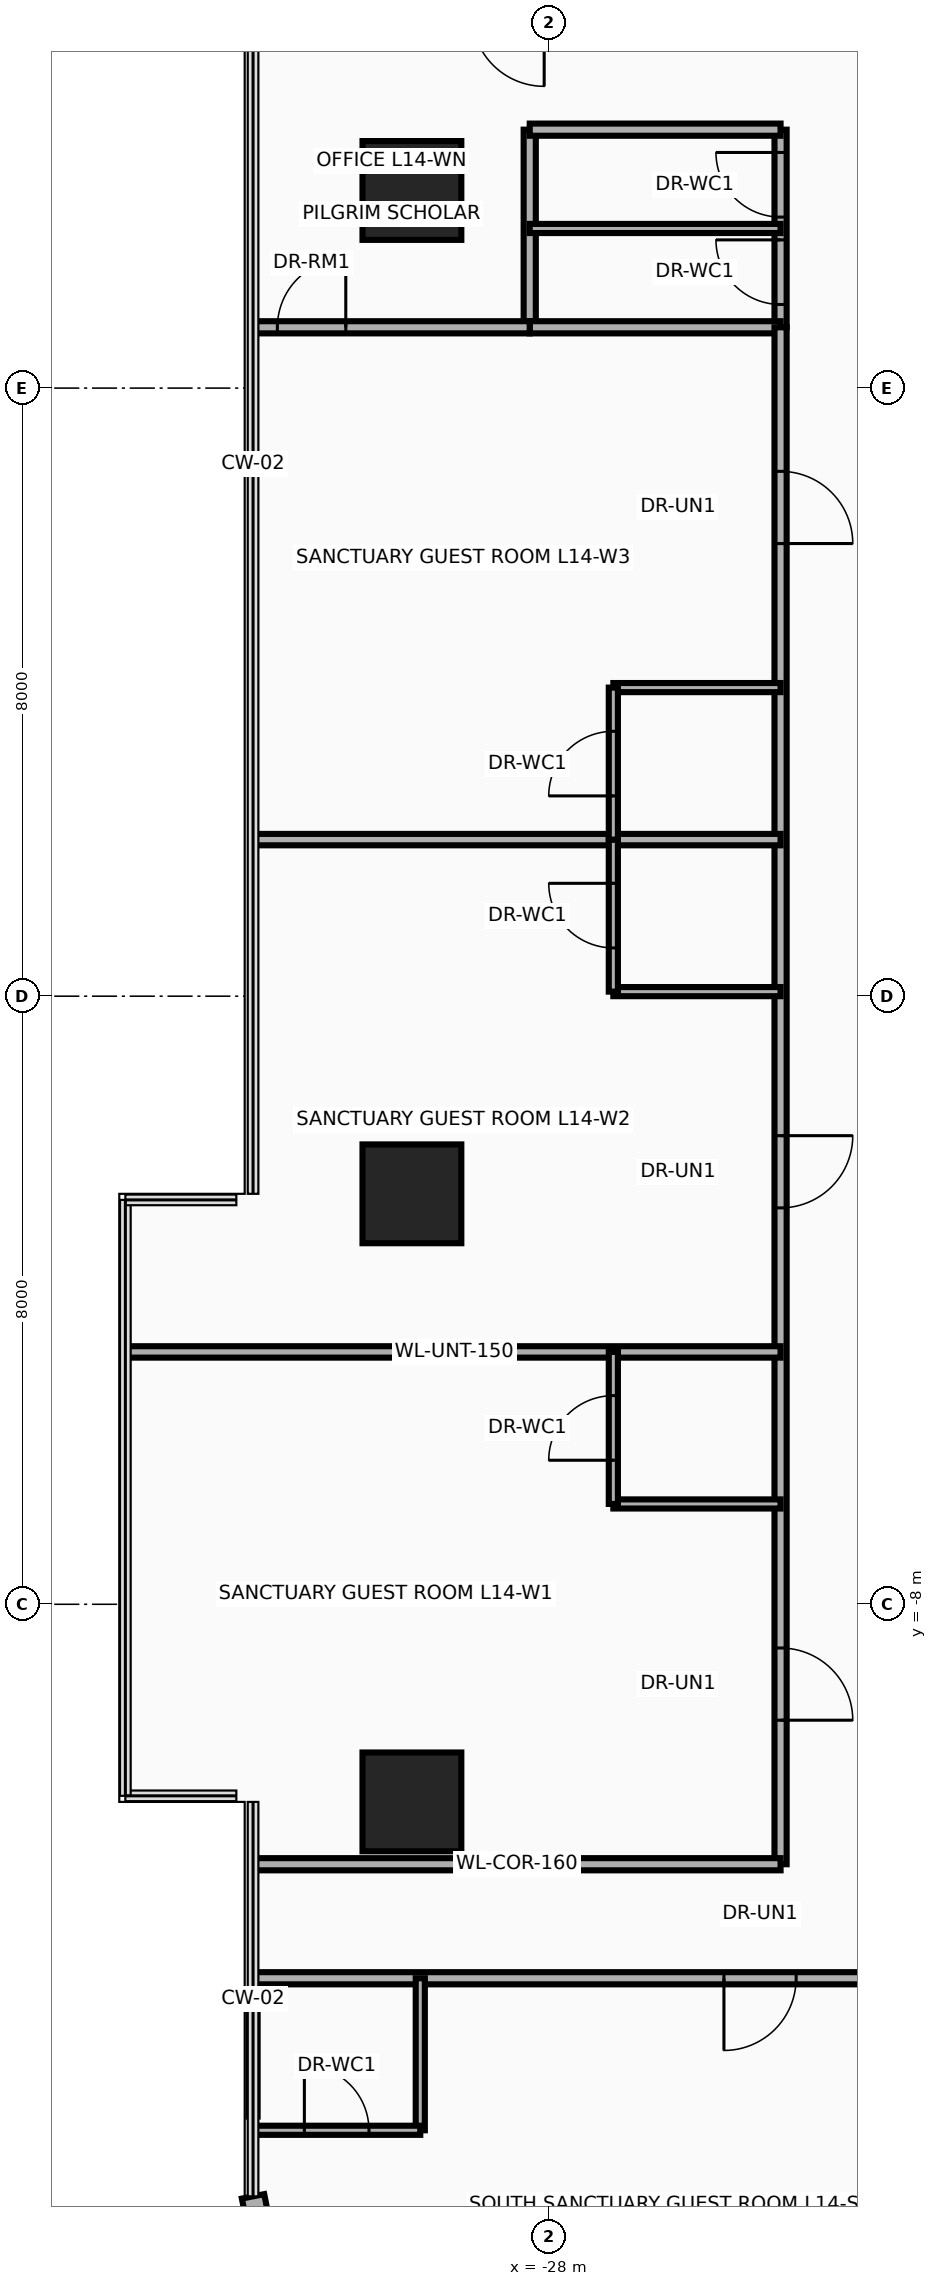
"""IFC4 building model, lengths in metres.
Left out: names, types, materials, properties, quantities, classifications, styles, units other than length and angle.
Written with IfcOpenShell. Run it as: python <this file> out.ifc"""

import sys

from ifc_helpers import new_model, si_unit, direction, frame, frame_2d, origin, origin_2d, place, context, subcontext, project, spatial, rectangle, circle, extrude, source, transform, mapped, element, fill, save


model = new_model("IFC4")
c1 = context("Model", 3, precision=1e-05, world=origin(), true_north=direction((0.0, 1.0)))
c2 = subcontext(c1, "Body", "Model", "MODEL_VIEW")
j1 = project(units=[si_unit("LENGTHUNIT", "METRE"), si_unit("PLANEANGLEUNIT", "RADIAN")], contexts=[c1])
p1 = place(None, origin())
s1 = spatial("IfcSite", under=j1, at=p1, CompositionType="ELEMENT")
p2 = place(p1, origin())
s2 = spatial("IfcBuilding", under=s1, at=p2, CompositionType="ELEMENT")
p3 = place(p2, frame((0.0, 0.0, 59.3)))
s3 = spatial("IfcBuildingStorey", under=s2, at=p3, CompositionType="ELEMENT", Elevation=59.3)
m1 = source(origin(), c2, "Body", "SweptSolid", [
    extrude(circle(Radius=0.65, at=origin_2d()), origin(), (0.0, 0.0, 1.0), 3.7),
])
for number, where, z_axis, x_axis in (
    (1, (-29.8, -10.6, 0.0), (0.0, 0.0, 1.0), (1.0, 0.0, 0.0)),
    (2, (-29.8, -2.6, 0.0), (0.0, 0.0, 1.0), (1.0, 0.0, 0.0)),
    (3, (-29.8, 10.6, 0.0), (0.0, 0.0, 1.0), (1.0, 0.0, 0.0)),
):
    element("IfcColumn", number, at=place(p3, frame(where, z_axis=z_axis, x_axis=x_axis)), inside=s3, PredefinedType="COLUMN", context=c2, shape_type="MappedRepresentation", body=[
        mapped(m1, transform((0.0, 0.0, 0.0), x_axis=(1.0, 0.0, 0.0), y_axis=(0.0, 1.0, 0.0), z_axis=(0.0, 0.0, 1.0), scale=1.0)),
    ])
p4 = place(p3, frame((-31.653, -16.982, 0.0), z_axis=(0.0, 0.0, 1.0), x_axis=(-0.194996050505, 0.980804027463, 0.0)))
e4 = element("IfcWall", 4, at=p4, inside=s3, PredefinedType="SOLIDWALL", context=c2, shape_type="SweptSolid", body=[
    extrude(rectangle(XDim=1.216, YDim=0.3, at=frame_2d((0.608, 0.0))), origin(), (0.0, 0.0, 1.0), 3.46),
])
p5 = place(p3, frame((-28.25, 8.8, 0.0), z_axis=(0.0, 0.0, 1.0), x_axis=(0.0, 1.0, 0.0)))
e5 = element("IfcWall", 5, at=p5, inside=s3, PredefinedType="PARTITIONING", context=c2, shape_type="SweptSolid", body=[
    extrude(rectangle(XDim=2.6, YDim=0.16, at=frame_2d((1.3, 0.0))), origin(), (0.0, 0.0, 1.0), 2.583),
])
p6 = place(p3, frame((-24.95, 8.8, 0.0), z_axis=(0.0, 0.0, 1.0), x_axis=(0.0, 1.0, 0.0)))
e6 = element("IfcWall", 6, at=p6, inside=s3, PredefinedType="PARTITIONING", context=c2, shape_type="SweptSolid", body=[
    extrude(rectangle(XDim=2.6, YDim=0.16, at=frame_2d((1.3, 0.0))), origin(), (0.0, 0.0, 1.0), 2.583),
])
p7 = place(p6, frame((0.3, 0.0, 0.0)))
e7 = element("IfcOpeningElement", 7, at=p7, cuts=e6, PredefinedType="OPENING", context=c2, shape_type="SweptSolid", body=[
    extrude(rectangle(XDim=0.85, YDim=2.1, at=frame_2d((0.425, 1.05))), frame((0.0, 0.095, 0.0), z_axis=(0.0, -1.0, 0.0), x_axis=(1.0, 0.0, 0.0)), (0.0, 0.0, 1.0), 0.19),
])
p8 = place(p6, frame((1.45, 0.0, 0.0)))
e8 = element("IfcOpeningElement", 8, at=p8, cuts=e6, PredefinedType="OPENING", context=c2, shape_type="SweptSolid", body=[
    extrude(rectangle(XDim=0.85, YDim=2.1, at=frame_2d((0.425, 1.05))), frame((0.0, 0.095, 0.0), z_axis=(0.0, -1.0, 0.0), x_axis=(1.0, 0.0, 0.0)), (0.0, 0.0, 1.0), 0.19),
])
for number, where, z_axis, x_axis in (
    (9, (-28.25, 8.8, 0.0), (0.0, 0.0, 1.0), (1.0, 0.0, 0.0)),
    (10, (-28.25, 11.4, 0.0), (0.0, 0.0, 1.0), (1.0, 0.0, 0.0)),
):
    element("IfcWall", number, at=place(p3, frame(where, z_axis=z_axis, x_axis=x_axis)), inside=s3, PredefinedType="PARTITIONING", context=c2, shape_type="SweptSolid", body=[
        extrude(rectangle(XDim=3.3, YDim=0.16, at=frame_2d((1.65, 0.0))), origin(), (0.0, 0.0, 1.0), 3.46),
    ])
p9 = place(p3, frame((-28.25, 10.1, 0.0), z_axis=(0.0, 0.0, 1.0), x_axis=(1.0, 0.0, 0.0)))
e11 = element("IfcWall", 11, at=p9, inside=s3, PredefinedType="PARTITIONING", context=c2, shape_type="SweptSolid", body=[
    extrude(rectangle(XDim=3.3, YDim=0.12, at=frame_2d((1.65, 0.0))), origin(), (0.0, 0.0, 1.0), 3.46),
])
p10 = place(p3, frame((-24.95, -11.42, 0.0), z_axis=(0.0, 0.0, 1.0), x_axis=(0.0, 1.0, 0.0)))
e12 = element("IfcWall", 12, at=p10, inside=s3, PredefinedType="PARTITIONING", context=c2, shape_type="SweptSolid", body=[
    extrude(rectangle(XDim=20.22, YDim=0.16, at=frame_2d((10.11, 0.0))), origin(), (0.0, 0.0, 1.0), 2.583),
])
p11 = place(p10, frame((1.895, 0.0, 0.0)))
e13 = element("IfcOpeningElement", 13, at=p11, cuts=e12, PredefinedType="OPENING", context=c2, shape_type="SweptSolid", body=[
    extrude(rectangle(XDim=0.95, YDim=2.15, at=frame_2d((0.475, 1.075))), frame((0.0, 0.095, 0.0), z_axis=(0.0, -1.0, 0.0), x_axis=(1.0, 0.0, 0.0)), (0.0, 0.0, 1.0), 0.19),
])
p12 = place(p10, frame((8.635, 0.0, 0.0)))
e14 = element("IfcOpeningElement", 14, at=p12, cuts=e12, PredefinedType="OPENING", context=c2, shape_type="SweptSolid", body=[
    extrude(rectangle(XDim=0.95, YDim=2.15, at=frame_2d((0.475, 1.075))), frame((0.0, 0.095, 0.0), z_axis=(0.0, -1.0, 0.0), x_axis=(1.0, 0.0, 0.0)), (0.0, 0.0, 1.0), 0.19),
])
p13 = place(p10, frame((17.375, 0.0, 0.0)))
e15 = element("IfcOpeningElement", 15, at=p13, cuts=e12, PredefinedType="OPENING", context=c2, shape_type="SweptSolid", body=[
    extrude(rectangle(XDim=0.95, YDim=2.15, at=frame_2d((0.475, 1.075))), frame((0.0, 0.095, 0.0), z_axis=(0.0, -1.0, 0.0), x_axis=(1.0, 0.0, 0.0)), (0.0, 0.0, 1.0), 0.19),
])
p14 = place(p3, frame((-31.89, 8.8, 0.0), z_axis=(0.0, 0.0, 1.0), x_axis=(1.0, 0.0, 0.0)))
e16 = element("IfcWall", 16, at=p14, inside=s3, PredefinedType="PARTITIONING", context=c2, shape_type="SweptSolid", body=[
    extrude(rectangle(XDim=3.64, YDim=0.16, at=frame_2d((1.82, 0.0))), origin(), (0.0, 0.0, 1.0), 2.896),
])
p15 = place(p14, frame((0.32, 0.0, 0.0)))
e17 = element("IfcOpeningElement", 17, at=p15, cuts=e16, PredefinedType="OPENING", context=c2, shape_type="SweptSolid", body=[
    extrude(rectangle(XDim=0.9, YDim=2.1, at=frame_2d((0.45, 1.05))), frame((0.0, 0.095, 0.0), z_axis=(0.0, -1.0, 0.0), x_axis=(1.0, 0.0, 0.0)), (0.0, 0.0, 1.0), 0.19),
])
p16 = place(p3, frame((-33.54, -4.68, 0.0), z_axis=(0.0, 0.0, 1.0), x_axis=(1.0, 0.0, 0.0)))
e18 = element("IfcWall", 18, at=p16, inside=s3, PredefinedType="PARTITIONING", context=c2, shape_type="SweptSolid", body=[
    extrude(rectangle(XDim=8.59, YDim=0.15, at=frame_2d((4.295, 0.0))), origin(), (0.0, 0.0, 1.0), 2.896),
])
p17 = place(p3, frame((-31.89, 2.06, 0.0), z_axis=(0.0, 0.0, 1.0), x_axis=(1.0, 0.0, 0.0)))
e19 = element("IfcWall", 19, at=p17, inside=s3, PredefinedType="PARTITIONING", context=c2, shape_type="SweptSolid", body=[
    extrude(rectangle(XDim=6.94, YDim=0.15, at=frame_2d((3.47, 0.0))), origin(), (0.0, 0.0, 1.0), 2.896),
])
p18 = place(p3, frame((-27.15, -6.68, 0.0), z_axis=(0.0, 0.0, 1.0), x_axis=(1.0, 0.0, 0.0)))
e20 = element("IfcWall", 20, at=p18, inside=s3, PredefinedType="PARTITIONING", context=c2, shape_type="SweptSolid", body=[
    extrude(rectangle(XDim=2.2, YDim=0.12, at=frame_2d((1.1, 0.0))), origin(), (0.0, 0.0, 1.0), 2.979),
])
p19 = place(p3, frame((-27.15, -6.68, 0.0), z_axis=(0.0, 0.0, 1.0), x_axis=(0.0, 1.0, 0.0)))
e21 = element("IfcWall", 21, at=p19, inside=s3, PredefinedType="PARTITIONING", context=c2, shape_type="SweptSolid", body=[
    extrude(rectangle(XDim=2.0, YDim=0.12, at=frame_2d((1.0, 0.0))), origin(), (0.0, 0.0, 1.0), 2.979),
])
p20 = place(p19, frame((0.575, 0.0, 0.0)))
e22 = element("IfcOpeningElement", 22, at=p20, cuts=e21, PredefinedType="OPENING", context=c2, shape_type="SweptSolid", body=[
    extrude(rectangle(XDim=0.85, YDim=2.1, at=frame_2d((0.425, 1.05))), frame((0.0, 0.075, 0.0), z_axis=(0.0, -1.0, 0.0), x_axis=(1.0, 0.0, 0.0)), (0.0, 0.0, 1.0), 0.15),
])
p21 = place(p3, frame((-27.15, 0.06, 0.0), z_axis=(0.0, 0.0, 1.0), x_axis=(1.0, 0.0, 0.0)))
e23 = element("IfcWall", 23, at=p21, inside=s3, PredefinedType="PARTITIONING", context=c2, shape_type="SweptSolid", body=[
    extrude(rectangle(XDim=2.2, YDim=0.12, at=frame_2d((1.1, 0.0))), origin(), (0.0, 0.0, 1.0), 2.979),
])
p22 = place(p3, frame((-27.15, 0.06, 0.0), z_axis=(0.0, 0.0, 1.0), x_axis=(0.0, 1.0, 0.0)))
e24 = element("IfcWall", 24, at=p22, inside=s3, PredefinedType="PARTITIONING", context=c2, shape_type="SweptSolid", body=[
    extrude(rectangle(XDim=2.0, YDim=0.12, at=frame_2d((1.0, 0.0))), origin(), (0.0, 0.0, 1.0), 2.979),
])
p23 = place(p22, frame((0.575, 0.0, 0.0)))
e25 = element("IfcOpeningElement", 25, at=p23, cuts=e24, PredefinedType="OPENING", context=c2, shape_type="SweptSolid", body=[
    extrude(rectangle(XDim=0.85, YDim=2.1, at=frame_2d((0.425, 1.05))), frame((0.0, 0.075, 0.0), z_axis=(0.0, -1.0, 0.0), x_axis=(1.0, 0.0, 0.0)), (0.0, 0.0, 1.0), 0.15),
])
p24 = place(p3, frame((-27.15, 4.06, 0.0), z_axis=(0.0, 0.0, 1.0), x_axis=(1.0, 0.0, 0.0)))
e26 = element("IfcWall", 26, at=p24, inside=s3, PredefinedType="PARTITIONING", context=c2, shape_type="SweptSolid", body=[
    extrude(rectangle(XDim=2.2, YDim=0.12, at=frame_2d((1.1, 0.0))), origin(), (0.0, 0.0, 1.0), 3.46),
])
p25 = place(p3, frame((-27.15, 2.06, 0.0), z_axis=(0.0, 0.0, 1.0), x_axis=(0.0, 1.0, 0.0)))
e27 = element("IfcWall", 27, at=p25, inside=s3, PredefinedType="PARTITIONING", context=c2, shape_type="SweptSolid", body=[
    extrude(rectangle(XDim=2.0, YDim=0.12, at=frame_2d((1.0, 0.0))), origin(), (0.0, 0.0, 1.0), 2.979),
])
p26 = place(p25, frame((0.575, 0.0, 0.0)))
e28 = element("IfcOpeningElement", 28, at=p26, cuts=e27, PredefinedType="OPENING", context=c2, shape_type="SweptSolid", body=[
    extrude(rectangle(XDim=0.85, YDim=2.1, at=frame_2d((0.425, 1.05))), frame((0.0, 0.075, 0.0), z_axis=(0.0, -1.0, 0.0), x_axis=(1.0, 0.0, 0.0)), (0.0, 0.0, 1.0), 0.15),
])
p27 = place(p3, frame((-31.89, -12.92, 0.0), z_axis=(0.0, 0.0, 1.0), x_axis=(1.0, 0.0, 0.0)))
e29 = element("IfcWall", 29, at=p27, inside=s3, PredefinedType="PARTITIONING", context=c2, shape_type="SweptSolid", body=[
    extrude(rectangle(XDim=22.28, YDim=0.16, at=frame_2d((11.14, 0.0))), origin(), (0.0, 0.0, 1.0), 2.834),
])
p28 = place(p27, frame((6.195, 0.0, 0.0)))
e30 = element("IfcOpeningElement", 30, at=p28, cuts=e29, PredefinedType="OPENING", context=c2, shape_type="SweptSolid", body=[
    extrude(rectangle(XDim=0.95, YDim=2.15, at=frame_2d((0.475, 1.075))), frame((0.0, 0.095, 0.0), z_axis=(0.0, -1.0, 0.0), x_axis=(1.0, 0.0, 0.0)), (0.0, 0.0, 1.0), 0.19),
])
p29 = place(p27, frame((17.335, 0.0, 0.0)))
e31 = element("IfcOpeningElement", 31, at=p29, cuts=e29, PredefinedType="OPENING", context=c2, shape_type="SweptSolid", body=[
    extrude(rectangle(XDim=0.95, YDim=2.15, at=frame_2d((0.475, 1.075))), frame((0.0, 0.095, 0.0), z_axis=(0.0, -1.0, 0.0), x_axis=(1.0, 0.0, 0.0)), (0.0, 0.0, 1.0), 0.19),
])
p30 = place(p3, frame((-29.69, -14.92, 0.0), z_axis=(0.0, 0.0, 1.0), x_axis=(0.0, 1.0, 0.0)))
e32 = element("IfcWall", 32, at=p30, inside=s3, PredefinedType="PARTITIONING", context=c2, shape_type="SweptSolid", body=[
    extrude(rectangle(XDim=2.0, YDim=0.12, at=frame_2d((1.0, 0.0))), origin(), (0.0, 0.0, 1.0), 3.46),
])
p31 = place(p3, frame((-31.89, -14.92, 0.0), z_axis=(0.0, 0.0, 1.0), x_axis=(1.0, 0.0, 0.0)))
e33 = element("IfcWall", 33, at=p31, inside=s3, PredefinedType="PARTITIONING", context=c2, shape_type="SweptSolid", body=[
    extrude(rectangle(XDim=2.2, YDim=0.12, at=frame_2d((1.1, 0.0))), origin(), (0.0, 0.0, 1.0), 3.46),
])
p32 = place(p31, frame((0.675, 0.0, 0.0)))
e34 = element("IfcOpeningElement", 34, at=p32, cuts=e33, PredefinedType="OPENING", context=c2, shape_type="SweptSolid", body=[
    extrude(rectangle(XDim=0.85, YDim=2.1, at=frame_2d((0.425, 1.05))), frame((0.0, 0.075, 0.0), z_axis=(0.0, -1.0, 0.0), x_axis=(1.0, 0.0, 0.0)), (0.0, 0.0, 1.0), 0.15),
])
p33 = place(p3, frame((-31.89, -14.74, 0.0), z_axis=(0.0, 0.0, 1.0), x_axis=(0.0, 1.0, 0.0)))
e35 = element("IfcWall", 35, at=p33, inside=s3, PredefinedType="PARTITIONING", context=c2, shape_type="SweptSolid", body=[
    extrude(rectangle(XDim=1.62, YDim=0.12, at=frame_2d((0.81, 0.0))), origin(), (0.0, 0.0, 1.0), 3.46),
])
p34 = place(p3, frame((-31.89, -11.42, 0.0), z_axis=(0.0, 0.0, 1.0), x_axis=(1.0, 0.0, 0.0)))
e36 = element("IfcWall", 36, at=p34, inside=s3, PredefinedType="PARTITIONING", context=c2, shape_type="SweptSolid", body=[
    extrude(rectangle(XDim=6.94, YDim=0.16, at=frame_2d((3.47, 0.0))), origin(), (0.0, 0.0, 1.0), 3.46),
])
p35 = place(p7, origin())
e37 = element("IfcDoor", 37, at=p35, inside=s3, OperationType="SINGLE_SWING_RIGHT", PredefinedType="DOOR", context=c2, shape_type="SweptSolid", body=[
    extrude(rectangle(XDim=0.85, YDim=2.1, at=frame_2d((0.425, 1.05))), frame((0.0, 0.025, 0.0), z_axis=(0.0, -1.0, 0.0), x_axis=(1.0, 0.0, 0.0)), (0.0, 0.0, 1.0), 0.05),
])
fill(e7, e37)
p36 = place(p8, origin())
e38 = element("IfcDoor", 38, at=p36, inside=s3, OperationType="SINGLE_SWING_LEFT", PredefinedType="DOOR", context=c2, shape_type="SweptSolid", body=[
    extrude(rectangle(XDim=0.85, YDim=2.1, at=frame_2d((0.425, 1.05))), frame((0.0, 0.025, 0.0), z_axis=(0.0, -1.0, 0.0), x_axis=(1.0, 0.0, 0.0)), (0.0, 0.0, 1.0), 0.05),
])
fill(e8, e38)
p37 = place(p15, origin())
e39 = element("IfcDoor", 39, at=p37, inside=s3, OperationType="SINGLE_SWING_RIGHT", PredefinedType="DOOR", context=c2, shape_type="SweptSolid", body=[
    extrude(rectangle(XDim=0.9, YDim=2.1, at=frame_2d((0.45, 1.05))), frame((0.0, 0.025, 0.0), z_axis=(0.0, -1.0, 0.0), x_axis=(1.0, 0.0, 0.0)), (0.0, 0.0, 1.0), 0.05),
])
fill(e17, e39)
p38 = place(p11, frame((0.95, 0.0, 0.0), z_axis=(0.0, 0.0, 1.0), x_axis=(-1.0, 0.0, 0.0)))
e40 = element("IfcDoor", 40, at=p38, inside=s3, OperationType="SINGLE_SWING_LEFT", PredefinedType="DOOR", context=c2, shape_type="SweptSolid", body=[
    extrude(rectangle(XDim=0.95, YDim=2.15, at=frame_2d((0.475, 1.075))), frame((0.0, 0.025, 0.0), z_axis=(0.0, -1.0, 0.0), x_axis=(1.0, 0.0, 0.0)), (0.0, 0.0, 1.0), 0.05),
])
fill(e13, e40)
p39 = place(p20, origin())
e41 = element("IfcDoor", 41, at=p39, inside=s3, OperationType="SINGLE_SWING_RIGHT", PredefinedType="DOOR", context=c2, shape_type="SweptSolid", body=[
    extrude(rectangle(XDim=0.85, YDim=2.1, at=frame_2d((0.425, 1.05))), frame((0.0, 0.025, 0.0), z_axis=(0.0, -1.0, 0.0), x_axis=(1.0, 0.0, 0.0)), (0.0, 0.0, 1.0), 0.05),
])
fill(e22, e41)
p40 = place(p12, frame((0.95, 0.0, 0.0), z_axis=(0.0, 0.0, 1.0), x_axis=(-1.0, 0.0, 0.0)))
e42 = element("IfcDoor", 42, at=p40, inside=s3, OperationType="SINGLE_SWING_LEFT", PredefinedType="DOOR", context=c2, shape_type="SweptSolid", body=[
    extrude(rectangle(XDim=0.95, YDim=2.15, at=frame_2d((0.475, 1.075))), frame((0.0, 0.025, 0.0), z_axis=(0.0, -1.0, 0.0), x_axis=(1.0, 0.0, 0.0)), (0.0, 0.0, 1.0), 0.05),
])
fill(e14, e42)
p41 = place(p23, origin())
e43 = element("IfcDoor", 43, at=p41, inside=s3, OperationType="SINGLE_SWING_RIGHT", PredefinedType="DOOR", context=c2, shape_type="SweptSolid", body=[
    extrude(rectangle(XDim=0.85, YDim=2.1, at=frame_2d((0.425, 1.05))), frame((0.0, 0.025, 0.0), z_axis=(0.0, -1.0, 0.0), x_axis=(1.0, 0.0, 0.0)), (0.0, 0.0, 1.0), 0.05),
])
fill(e25, e43)
p42 = place(p13, frame((0.95, 0.0, 0.0), z_axis=(0.0, 0.0, 1.0), x_axis=(-1.0, 0.0, 0.0)))
e44 = element("IfcDoor", 44, at=p42, inside=s3, OperationType="SINGLE_SWING_LEFT", PredefinedType="DOOR", context=c2, shape_type="SweptSolid", body=[
    extrude(rectangle(XDim=0.95, YDim=2.15, at=frame_2d((0.475, 1.075))), frame((0.0, 0.025, 0.0), z_axis=(0.0, -1.0, 0.0), x_axis=(1.0, 0.0, 0.0)), (0.0, 0.0, 1.0), 0.05),
])
fill(e15, e44)
p43 = place(p26, origin())
e45 = element("IfcDoor", 45, at=p43, inside=s3, OperationType="SINGLE_SWING_RIGHT", PredefinedType="DOOR", context=c2, shape_type="SweptSolid", body=[
    extrude(rectangle(XDim=0.85, YDim=2.1, at=frame_2d((0.425, 1.05))), frame((0.0, 0.025, 0.0), z_axis=(0.0, -1.0, 0.0), x_axis=(1.0, 0.0, 0.0)), (0.0, 0.0, 1.0), 0.05),
])
fill(e28, e45)
p44 = place(p28, frame((0.95, 0.0, 0.0), z_axis=(0.0, 0.0, 1.0), x_axis=(-1.0, 0.0, 0.0)))
e46 = element("IfcDoor", 46, at=p44, inside=s3, OperationType="SINGLE_SWING_LEFT", PredefinedType="DOOR", context=c2, shape_type="SweptSolid", body=[
    extrude(rectangle(XDim=0.95, YDim=2.15, at=frame_2d((0.475, 1.075))), frame((0.0, 0.025, 0.0), z_axis=(0.0, -1.0, 0.0), x_axis=(1.0, 0.0, 0.0)), (0.0, 0.0, 1.0), 0.05),
])
fill(e30, e46)
p45 = place(p32, origin())
e47 = element("IfcDoor", 47, at=p45, inside=s3, OperationType="SINGLE_SWING_RIGHT", PredefinedType="DOOR", context=c2, shape_type="SweptSolid", body=[
    extrude(rectangle(XDim=0.85, YDim=2.1, at=frame_2d((0.425, 1.05))), frame((0.0, 0.025, 0.0), z_axis=(0.0, -1.0, 0.0), x_axis=(1.0, 0.0, 0.0)), (0.0, 0.0, 1.0), 0.05),
])
fill(e34, e47)
save(model, sys.argv[1])
